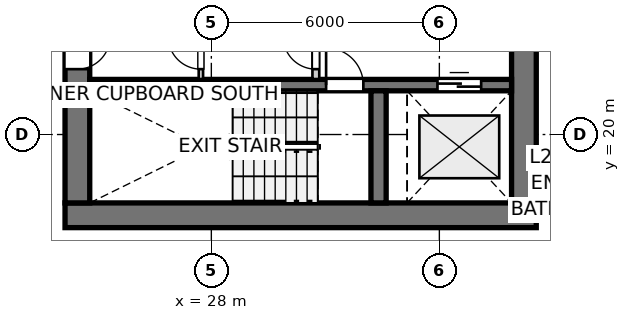
"""IFC4 building model, lengths in metres.
Left out: names, types, materials, properties, quantities, classifications, styles, units other than length and angle.
Written with IfcOpenShell. Run it as: python <this file> out.ifc"""

import sys

from ifc_helpers import new_model, si_unit, direction, frame, frame_2d, origin, place, context, subcontext, project, spatial, rectangle, extrude, source, transform, mapped, element, fill, save


model = new_model("IFC4")
c1 = context("Model", 3, precision=1e-05, world=origin(), true_north=direction((0.0, 1.0)))
c2 = subcontext(c1, "Body", "Model", "MODEL_VIEW")
j1 = project(units=[si_unit("LENGTHUNIT", "METRE"), si_unit("PLANEANGLEUNIT", "RADIAN")], contexts=[c1])
p1 = place(None, origin())
s1 = spatial("IfcSite", under=j1, at=p1, CompositionType="ELEMENT")
p2 = place(p1, origin())
s2 = spatial("IfcBuilding", under=s1, at=p2, CompositionType="ELEMENT")
p3 = place(p2, frame((0.0, 0.0, 86.4)))
s3 = spatial("IfcBuildingStorey", under=s2, at=p3, CompositionType="ELEMENT", Elevation=86.4)
p4 = place(p3, frame((24.15, 17.875, 0.0), z_axis=(0.0, 0.0, 1.0), x_axis=(1.0, 0.0, 0.0)))
e1 = element("IfcWall", 1, at=p4, inside=s3, PredefinedType="SHEAR", context=c2, shape_type="SweptSolid", body=[
    extrude(rectangle(XDim=12.4, YDim=0.65, at=frame_2d((6.2, 0.0))), origin(), (0.0, 0.0, 1.0), 2.95),
])
p5 = place(p3, frame((24.475, 33.8, 0.0), z_axis=(0.0, 0.0, 1.0), x_axis=(0.0, -1.0, 0.0)))
e2 = element("IfcWall", 2, at=p5, inside=s3, PredefinedType="SHEAR", context=c2, shape_type="SweptSolid", body=[
    extrude(rectangle(XDim=15.6, YDim=0.65, at=frame_2d((7.8, 0.0))), origin(), (0.0, 0.0, 1.0), 2.95),
])
p6 = place(p5, frame((7.05, 0.0, 0.0)))
e3 = element("IfcOpeningElement", 3, at=p6, cuts=e2, PredefinedType="OPENING", context=c2, shape_type="SweptSolid", body=[
    extrude(rectangle(XDim=1.5, YDim=2.15, at=frame_2d((0.75, 1.075))), frame((0.0, 0.335, 0.0), z_axis=(0.0, -1.0, 0.0), x_axis=(1.0, 0.0, 0.0)), (0.0, 0.0, 1.0), 0.67),
])
p7 = place(p5, frame((3.52, 0.0, 0.0)))
e4 = element("IfcOpeningElement", 4, at=p7, cuts=e2, PredefinedType="OPENING", context=c2, shape_type="SweptSolid", body=[
    extrude(rectangle(XDim=0.86, YDim=2.05, at=frame_2d((0.43, 1.025))), frame((0.0, 0.335, 0.0), z_axis=(0.0, -1.0, 0.0), x_axis=(1.0, 0.0, 0.0)), (0.0, 0.0, 1.0), 0.67),
])
p8 = place(p5, frame((11.22, 0.0, 0.0)))
e5 = element("IfcOpeningElement", 5, at=p8, cuts=e2, PredefinedType="OPENING", context=c2, shape_type="SweptSolid", body=[
    extrude(rectangle(XDim=0.86, YDim=2.05, at=frame_2d((0.43, 1.025))), frame((0.0, 0.335, 0.0), z_axis=(0.0, -1.0, 0.0), x_axis=(1.0, 0.0, 0.0)), (0.0, 0.0, 1.0), 0.67),
])
p9 = place(p3, frame((36.225, 18.2, 0.0), z_axis=(0.0, 0.0, 1.0), x_axis=(0.0, 1.0, 0.0)))
e6 = element("IfcWall", 6, at=p9, inside=s3, PredefinedType="SHEAR", context=c2, shape_type="SweptSolid", body=[
    extrude(rectangle(XDim=15.6, YDim=0.65, at=frame_2d((7.8, 0.0))), origin(), (0.0, 0.0, 1.0), 2.95),
])
p10 = place(p9, frame((4.25, 0.0, 0.0)))
e7 = element("IfcOpeningElement", 7, at=p10, cuts=e6, PredefinedType="OPENING", context=c2, shape_type="SweptSolid", body=[
    extrude(rectangle(XDim=1.1, YDim=2.15, at=frame_2d((0.55, 1.075))), frame((0.0, 0.335, 0.0), z_axis=(0.0, -1.0, 0.0), x_axis=(1.0, 0.0, 0.0)), (0.0, 0.0, 1.0), 0.67),
])
p11 = place(p9, frame((10.25, 0.0, 0.0)))
e8 = element("IfcOpeningElement", 8, at=p11, cuts=e6, PredefinedType="OPENING", context=c2, shape_type="SweptSolid", body=[
    extrude(rectangle(XDim=1.1, YDim=2.15, at=frame_2d((0.55, 1.075))), frame((0.0, 0.335, 0.0), z_axis=(0.0, -1.0, 0.0), x_axis=(1.0, 0.0, 0.0)), (0.0, 0.0, 1.0), 0.67),
])
p12 = place(p3, frame((24.8, 21.3, 0.0), z_axis=(0.0, 0.0, 1.0), x_axis=(1.0, 0.0, 0.0)))
e9 = element("IfcWall", 9, at=p12, inside=s3, PredefinedType="SHEAR", context=c2, shape_type="SweptSolid", body=[
    extrude(rectangle(XDim=11.1, YDim=0.3, at=frame_2d((5.55, 0.0))), origin(), (0.0, 0.0, 1.0), 2.95),
])
p13 = place(p12, frame((6.22, 0.0, 0.0)))
e10 = element("IfcOpeningElement", 10, at=p13, cuts=e9, PredefinedType="OPENING", context=c2, shape_type="SweptSolid", body=[
    extrude(rectangle(XDim=0.98, YDim=2.15, at=frame_2d((0.49, 1.075))), frame((0.0, 0.16, 0.0), z_axis=(0.0, -1.0, 0.0), x_axis=(1.0, 0.0, 0.0)), (0.0, 0.0, 1.0), 0.32),
])
p14 = place(p12, frame((9.15, 0.0, 0.0)))
e11 = element("IfcOpeningElement", 11, at=p14, cuts=e9, PredefinedType="OPENING", context=c2, shape_type="SweptSolid", body=[
    extrude(rectangle(XDim=1.15, YDim=2.15, at=frame_2d((0.575, 1.075))), frame((0.0, 0.16, 0.0), z_axis=(0.0, -1.0, 0.0), x_axis=(1.0, 0.0, 0.0)), (0.0, 0.0, 1.0), 0.32),
])
p15 = place(p3, frame((32.4, 18.2, 0.0), z_axis=(0.0, 0.0, 1.0), x_axis=(0.0, 1.0, 0.0)))
e12 = element("IfcWall", 12, at=p15, inside=s3, PredefinedType="SHEAR", context=c2, shape_type="SweptSolid", body=[
    extrude(rectangle(XDim=2.95, YDim=0.4, at=frame_2d((1.475, 0.0))), origin(), (0.0, 0.0, 1.0), 2.95),
])
p16 = place(p3, frame((30.75, 21.46, 0.0), z_axis=(0.0, 0.0, 1.0), x_axis=(0.0, 1.0, 0.0)))
e13 = element("IfcWall", 13, at=p16, inside=s3, PredefinedType="PARTITIONING", context=c2, shape_type="SweptSolid", body=[
    extrude(rectangle(XDim=3.11, YDim=0.18, at=frame_2d((1.555, 0.0))), origin(), (0.0, 0.0, 1.0), 2.95),
])
p17 = place(p16, frame((0.26, 0.0, 0.0)))
e14 = element("IfcOpeningElement", 14, at=p17, cuts=e13, PredefinedType="OPENING", context=c2, shape_type="SweptSolid", body=[
    extrude(rectangle(XDim=0.86, YDim=2.05, at=frame_2d((0.43, 1.025))), frame((0.0, 0.1, 0.0), z_axis=(0.0, -1.0, 0.0), x_axis=(1.0, 0.0, 0.0)), (0.0, 0.0, 1.0), 0.2),
])
p18 = place(p3, frame((27.725, 21.46, 0.0), z_axis=(0.0, 0.0, 1.0), x_axis=(0.0, 1.0, 0.0)))
e15 = element("IfcWall", 15, at=p18, inside=s3, PredefinedType="PARTITIONING", context=c2, shape_type="SweptSolid", body=[
    extrude(rectangle(XDim=1.38, YDim=0.115, at=frame_2d((0.69, 0.0))), origin(), (0.0, 0.0, 1.0), 2.95),
])
p19 = place(p18, frame((0.26, 0.0, 0.0)))
e16 = element("IfcOpeningElement", 16, at=p19, cuts=e15, PredefinedType="OPENING", context=c2, shape_type="SweptSolid", body=[
    extrude(rectangle(XDim=0.86, YDim=2.05, at=frame_2d((0.43, 1.025))), frame((0.0, 0.067, 0.0), z_axis=(0.0, -1.0, 0.0), x_axis=(1.0, 0.0, 0.0)), (0.0, 0.0, 1.0), 0.135),
])
m1 = source(origin(), c2, "Body", "SweptSolid", [
    extrude(rectangle(XDim=0.98, YDim=2.15, at=frame_2d((0.49, 1.075))), frame((0.0, 0.025, 0.0), z_axis=(0.0, -1.0, 0.0), x_axis=(1.0, 0.0, 0.0)), (0.0, 0.0, 1.0), 0.05),
])
p20 = place(p13, origin())
e17 = element("IfcDoor", 17, at=p20, inside=s3, OperationType="SINGLE_SWING_LEFT", PredefinedType="DOOR", context=c2, shape_type="MappedRepresentation", body=[
    mapped(m1, transform((0.0, 0.0, 0.0), x_axis=(1.0, 0.0, 0.0), y_axis=(0.0, 1.0, 0.0), z_axis=(0.0, 0.0, 1.0), scale=1.0)),
])
fill(e10, e17)
m2 = source(origin(), c2, "Body", "SweptSolid", [
    extrude(rectangle(XDim=1.15, YDim=2.15, at=frame_2d((0.575, 1.075))), frame((0.0, 0.025, 0.0), z_axis=(0.0, -1.0, 0.0), x_axis=(1.0, 0.0, 0.0)), (0.0, 0.0, 1.0), 0.05),
])
p21 = place(p14, origin())
e18 = element("IfcDoor", 18, at=p21, inside=s3, OperationType="DOUBLE_DOOR_SLIDING", PredefinedType="DOOR", context=c2, shape_type="MappedRepresentation", body=[
    mapped(m2, transform((0.0, 0.0, 0.0), x_axis=(1.0, 0.0, 0.0), y_axis=(0.0, 1.0, 0.0), z_axis=(0.0, 0.0, 1.0), scale=1.0)),
])
fill(e11, e18)
m3 = source(origin(), c2, "Body", "SweptSolid", [
    extrude(rectangle(XDim=0.86, YDim=2.05, at=frame_2d((0.43, 1.025))), frame((0.0, 0.025, 0.0), z_axis=(0.0, -1.0, 0.0), x_axis=(1.0, 0.0, 0.0)), (0.0, 0.0, 1.0), 0.05),
])
p22 = place(p8, origin())
e19 = element("IfcDoor", 19, at=p22, inside=s3, OperationType="SINGLE_SWING_LEFT", PredefinedType="DOOR", context=c2, shape_type="MappedRepresentation", body=[
    mapped(m3, transform((0.0, 0.0, 0.0), x_axis=(1.0, 0.0, 0.0), y_axis=(0.0, 1.0, 0.0), z_axis=(0.0, 0.0, 1.0), scale=1.0)),
])
fill(e5, e19)
p23 = place(p17, origin())
e20 = element("IfcDoor", 20, at=p23, inside=s3, OperationType="SINGLE_SWING_RIGHT", PredefinedType="DOOR", context=c2, shape_type="MappedRepresentation", body=[
    mapped(m3, transform((0.0, 0.0, 0.0), x_axis=(1.0, 0.0, 0.0), y_axis=(0.0, 1.0, 0.0), z_axis=(0.0, 0.0, 1.0), scale=1.0)),
])
fill(e14, e20)
p24 = place(p19, origin())
e21 = element("IfcDoor", 21, at=p24, inside=s3, OperationType="SINGLE_SWING_RIGHT", PredefinedType="DOOR", context=c2, shape_type="MappedRepresentation", body=[
    mapped(m3, transform((0.0, 0.0, 0.0), x_axis=(1.0, 0.0, 0.0), y_axis=(0.0, 1.0, 0.0), z_axis=(0.0, 0.0, 1.0), scale=1.0)),
])
fill(e16, e21)
save(model, sys.argv[1])
